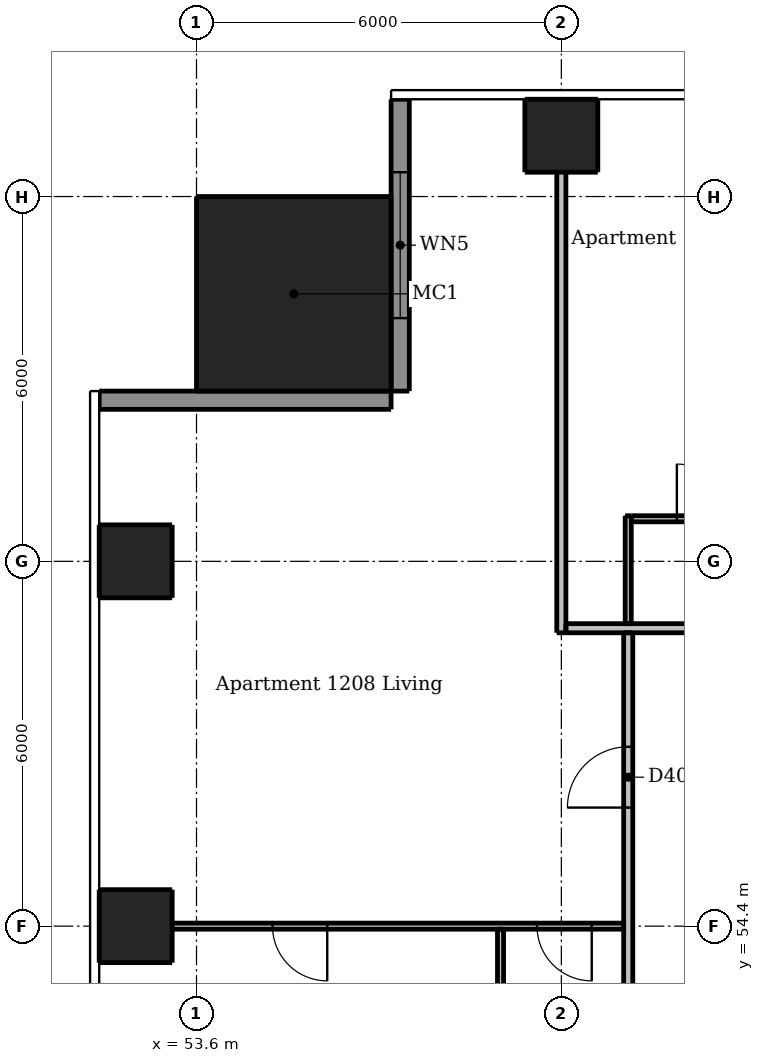
"""IFC4 building model, lengths in metres.
Left out: names, types, materials, properties, quantities, classifications, styles, units other than length and angle.
Written with IfcOpenShell. Run it as: python <this file> out.ifc"""

import sys

from ifc_helpers import new_model, si_unit, direction, frame, frame_2d, origin, origin_2d, place, context, subcontext, project, spatial, rectangle, extrude, element, fill, save


model = new_model("IFC4")
c1 = context("Model", 3, precision=1e-05, world=origin(), true_north=direction((0.0, 1.0)))
c2 = subcontext(c1, "Body", "Model", "MODEL_VIEW")
j1 = project(units=[si_unit("LENGTHUNIT", "METRE"), si_unit("PLANEANGLEUNIT", "RADIAN")], contexts=[c1])
p1 = place(None, origin())
s1 = spatial("IfcSite", under=j1, at=p1, CompositionType="ELEMENT")
p2 = place(p1, origin())
s2 = spatial("IfcBuilding", under=s1, at=p2, CompositionType="ELEMENT")
p3 = place(p2, frame((0.0, 0.0, 46.6)))
s3 = spatial("IfcBuildingStorey", under=s2, at=p3, CompositionType="ELEMENT", Elevation=46.6)
for number, where, z_axis, x_axis in (
    (1, (59.6, 67.4, 0.0), (0.0, 0.0, 1.0), (1.0, 0.0, 0.0)),
    (2, (52.6, 54.4, 0.0), (0.0, 0.0, 1.0), (1.0, 0.0, 0.0)),
    (3, (52.6, 60.4, 0.0), (0.0, 0.0, 1.0), (1.0, 0.0, 0.0)),
):
    element("IfcColumn", number, at=place(p3, frame(where, z_axis=z_axis, x_axis=x_axis)), inside=s3, PredefinedType="COLUMN", context=c2, shape_type="SweptSolid", body=[
        extrude(rectangle(XDim=1.2, YDim=1.2, at=origin_2d()), origin(), (0.0, 0.0, 1.0), 3.05),
    ])
p4 = place(p3, frame((55.2, 64.8, 0.0), z_axis=(0.0, 0.0, 1.0), x_axis=(1.0, 0.0, 0.0)))
e4 = element("IfcColumn", 4, at=p4, inside=s3, PredefinedType="COLUMN", context=c2, shape_type="SweptSolid", body=[
    extrude(rectangle(XDim=3.2, YDim=3.2, at=origin_2d()), origin(), (0.0, 0.0, 1.0), 3.3),
])
p5 = place(p3, frame((56.95, 68.0, 0.0), z_axis=(0.0, 0.0, 1.0), x_axis=(0.0, -1.0, 0.0)))
e5 = element("IfcWall", 5, at=p5, inside=s3, PredefinedType="SOLIDWALL", context=c2, shape_type="SweptSolid", body=[
    extrude(rectangle(XDim=4.8, YDim=0.3, at=frame_2d((2.4, 0.0))), origin(), (0.0, 0.0, 1.0), 3.05),
])
p6 = place(p5, frame((1.2, 0.0, 0.15)))
e6 = element("IfcOpeningElement", 6, at=p6, cuts=e5, PredefinedType="OPENING", context=c2, shape_type="SweptSolid", body=[
    extrude(rectangle(XDim=2.4, YDim=2.1, at=frame_2d((1.2, 1.05))), frame((0.0, 0.16, 0.0), z_axis=(0.0, -1.0, 0.0), x_axis=(1.0, 0.0, 0.0)), (0.0, 0.0, 1.0), 0.32),
])
p7 = place(p3, frame((56.8, 63.05, 0.0), z_axis=(0.0, 0.0, 1.0), x_axis=(-1.0, 0.0, 0.0)))
e7 = element("IfcWall", 7, at=p7, inside=s3, PredefinedType="SOLIDWALL", context=c2, shape_type="SweptSolid", body=[
    extrude(rectangle(XDim=4.8, YDim=0.3, at=frame_2d((2.4, 0.0))), origin(), (0.0, 0.0, 1.0), 3.05),
])
p8 = place(p3, frame((58.6, 54.35, 0.0), z_axis=(0.0, 0.0, 1.0), x_axis=(0.0, -1.0, 0.0)))
e8 = element("IfcWall", 8, at=p8, inside=s3, PredefinedType="PARTITIONING", context=c2, shape_type="SweptSolid", body=[
    extrude(rectangle(XDim=9.6, YDim=0.1, at=frame_2d((4.8, 0.0))), origin(), (0.0, 0.0, 1.0), 3.05),
])
p9 = place(p8, frame((7.35, 0.0, 0.0)))
e9 = element("IfcOpeningElement", 9, at=p9, cuts=e8, PredefinedType="OPENING", context=c2, shape_type="SweptSolid", body=[
    extrude(rectangle(XDim=0.8, YDim=2.1, at=frame_2d((0.4, 1.05))), frame((0.0, 0.06, 0.0), z_axis=(0.0, -1.0, 0.0), x_axis=(1.0, 0.0, 0.0)), (0.0, 0.0, 1.0), 0.12),
])
p10 = place(p8, frame((3.75, 0.0, 0.0)))
e10 = element("IfcOpeningElement", 10, at=p10, cuts=e8, PredefinedType="OPENING", context=c2, shape_type="SweptSolid", body=[
    extrude(rectangle(XDim=0.8, YDim=2.1, at=frame_2d((0.4, 1.05))), frame((0.0, 0.06, 0.0), z_axis=(0.0, -1.0, 0.0), x_axis=(1.0, 0.0, 0.0)), (0.0, 0.0, 1.0), 0.12),
])
p11 = place(p3, frame((60.7, 59.375, 0.0), z_axis=(0.0, 0.0, 1.0), x_axis=(0.0, 1.0, 0.0)))
e11 = element("IfcWall", 11, at=p11, inside=s3, PredefinedType="PARTITIONING", context=c2, shape_type="SweptSolid", body=[
    extrude(rectangle(XDim=1.775, YDim=0.1, at=frame_2d((0.887, 0.0))), origin(), (0.0, 0.0, 1.0), 3.05),
])
p12 = place(p3, frame((60.75, 61.1, 0.0), z_axis=(0.0, 0.0, 1.0), x_axis=(1.0, 0.0, 0.0)))
e12 = element("IfcWall", 12, at=p12, inside=s3, PredefinedType="PARTITIONING", context=c2, shape_type="SweptSolid", body=[
    extrude(rectangle(XDim=16.775, YDim=0.1, at=frame_2d((8.387, 0.0))), origin(), (0.0, 0.0, 1.0), 3.05),
])
p13 = place(p12, frame((11.3, 0.0, 0.0)))
e13 = element("IfcOpeningElement", 13, at=p13, cuts=e12, PredefinedType="OPENING", context=c2, shape_type="SweptSolid", body=[
    extrude(rectangle(XDim=0.9, YDim=2.1, at=frame_2d((0.45, 1.05))), frame((0.0, 0.06, 0.0), z_axis=(0.0, -1.0, 0.0), x_axis=(1.0, 0.0, 0.0)), (0.0, 0.0, 1.0), 0.12),
])
p14 = place(p12, frame((15.2, 0.0, 0.0)))
e14 = element("IfcOpeningElement", 14, at=p14, cuts=e12, PredefinedType="OPENING", context=c2, shape_type="SweptSolid", body=[
    extrude(rectangle(XDim=0.9, YDim=2.1, at=frame_2d((0.45, 1.05))), frame((0.0, 0.06, 0.0), z_axis=(0.0, -1.0, 0.0), x_axis=(1.0, 0.0, 0.0)), (0.0, 0.0, 1.0), 0.12),
])
p15 = place(p12, frame((13.1, 0.0, 0.0)))
e15 = element("IfcOpeningElement", 15, at=p15, cuts=e12, PredefinedType="OPENING", context=c2, shape_type="SweptSolid", body=[
    extrude(rectangle(XDim=0.9, YDim=2.1, at=frame_2d((0.45, 1.05))), frame((0.0, 0.06, 0.0), z_axis=(0.0, -1.0, 0.0), x_axis=(1.0, 0.0, 0.0)), (0.0, 0.0, 1.0), 0.12),
])
p16 = place(p12, frame((0.75, 0.0, 0.0)))
e16 = element("IfcOpeningElement", 16, at=p16, cuts=e12, PredefinedType="OPENING", context=c2, shape_type="SweptSolid", body=[
    extrude(rectangle(XDim=0.9, YDim=2.1, at=frame_2d((0.45, 1.05))), frame((0.0, 0.06, 0.0), z_axis=(0.0, -1.0, 0.0), x_axis=(1.0, 0.0, 0.0)), (0.0, 0.0, 1.0), 0.12),
])
p17 = place(p12, frame((6.2, 0.0, 0.0)))
e17 = element("IfcOpeningElement", 17, at=p17, cuts=e12, PredefinedType="OPENING", context=c2, shape_type="SweptSolid", body=[
    extrude(rectangle(XDim=0.9, YDim=2.1, at=frame_2d((0.45, 1.05))), frame((0.0, 0.06, 0.0), z_axis=(0.0, -1.0, 0.0), x_axis=(1.0, 0.0, 0.0)), (0.0, 0.0, 1.0), 0.12),
])
p18 = place(p12, frame((3.25, 0.0, 0.0)))
e18 = element("IfcOpeningElement", 18, at=p18, cuts=e12, PredefinedType="OPENING", context=c2, shape_type="SweptSolid", body=[
    extrude(rectangle(XDim=0.8, YDim=2.1, at=frame_2d((0.4, 1.05))), frame((0.0, 0.06, 0.0), z_axis=(0.0, -1.0, 0.0), x_axis=(1.0, 0.0, 0.0)), (0.0, 0.0, 1.0), 0.12),
])
p19 = place(p12, frame((9.25, 0.0, 0.0)))
e19 = element("IfcOpeningElement", 19, at=p19, cuts=e12, PredefinedType="OPENING", context=c2, shape_type="SweptSolid", body=[
    extrude(rectangle(XDim=0.8, YDim=2.1, at=frame_2d((0.4, 1.05))), frame((0.0, 0.06, 0.0), z_axis=(0.0, -1.0, 0.0), x_axis=(1.0, 0.0, 0.0)), (0.0, 0.0, 1.0), 0.12),
])
p20 = place(p3, frame((60.625, 54.4, 0.0), z_axis=(0.0, 0.0, 1.0), x_axis=(-1.0, 0.0, 0.0)))
e20 = element("IfcWall", 20, at=p20, inside=s3, PredefinedType="PARTITIONING", context=c2, shape_type="SweptSolid", body=[
    extrude(rectangle(XDim=8.625, YDim=0.1, at=frame_2d((4.312, 0.0))), origin(), (0.0, 0.0, 1.0), 2.516),
])
p21 = place(p20, frame((0.525, 0.0, 0.0)))
e21 = element("IfcOpeningElement", 21, at=p21, cuts=e20, PredefinedType="OPENING", context=c2, shape_type="SweptSolid", body=[
    extrude(rectangle(XDim=0.9, YDim=2.1, at=frame_2d((0.45, 1.05))), frame((0.0, 0.06, 0.0), z_axis=(0.0, -1.0, 0.0), x_axis=(1.0, 0.0, 0.0)), (0.0, 0.0, 1.0), 0.12),
])
p22 = place(p20, frame((4.875, 0.0, 0.0)))
e22 = element("IfcOpeningElement", 22, at=p22, cuts=e20, PredefinedType="OPENING", context=c2, shape_type="SweptSolid", body=[
    extrude(rectangle(XDim=0.9, YDim=2.1, at=frame_2d((0.45, 1.05))), frame((0.0, 0.06, 0.0), z_axis=(0.0, -1.0, 0.0), x_axis=(1.0, 0.0, 0.0)), (0.0, 0.0, 1.0), 0.12),
])
p23 = place(p3, frame((59.6, 59.225, 0.0), z_axis=(0.0, 0.0, 1.0), x_axis=(0.0, 1.0, 0.0)))
e23 = element("IfcWall", 23, at=p23, inside=s3, PredefinedType="PARTITIONING", context=c2, shape_type="SweptSolid", body=[
    extrude(rectangle(XDim=8.775, YDim=0.15, at=frame_2d((4.387, 0.0))), origin(), (0.0, 0.0, 1.0), 2.51),
])
p24 = place(p3, frame((60.7, 30.325, 0.0), z_axis=(0.0, 0.0, 1.0), x_axis=(0.0, 1.0, 0.0)))
e24 = element("IfcWall", 24, at=p24, inside=s3, PredefinedType="PARTITIONING", context=c2, shape_type="SweptSolid", body=[
    extrude(rectangle(XDim=28.9, YDim=0.15, at=frame_2d((14.45, 0.0))), origin(), (0.0, 0.0, 1.0), 3.05),
])
p25 = place(p24, frame((7.375, 0.0, 0.0)))
e25 = element("IfcOpeningElement", 25, at=p25, cuts=e24, PredefinedType="OPENING", context=c2, shape_type="SweptSolid", body=[
    extrude(rectangle(XDim=1.0, YDim=2.1, at=frame_2d((0.5, 1.05))), frame((0.0, 0.085, 0.0), z_axis=(0.0, -1.0, 0.0), x_axis=(1.0, 0.0, 0.0)), (0.0, 0.0, 1.0), 0.17),
])
p26 = place(p24, frame((26.025, 0.0, 0.0)))
e26 = element("IfcOpeningElement", 26, at=p26, cuts=e24, PredefinedType="OPENING", context=c2, shape_type="SweptSolid", body=[
    extrude(rectangle(XDim=1.0, YDim=2.1, at=frame_2d((0.5, 1.05))), frame((0.0, 0.085, 0.0), z_axis=(0.0, -1.0, 0.0), x_axis=(1.0, 0.0, 0.0)), (0.0, 0.0, 1.0), 0.17),
])
p27 = place(p3, frame((59.675, 59.3, 0.0), z_axis=(0.0, 0.0, 1.0), x_axis=(1.0, 0.0, 0.0)))
e27 = element("IfcWall", 27, at=p27, inside=s3, PredefinedType="PARTITIONING", context=c2, shape_type="SweptSolid", body=[
    extrude(rectangle(XDim=28.55, YDim=0.15, at=frame_2d((14.275, 0.0))), origin(), (0.0, 0.0, 1.0), 3.05),
])
p28 = place(p27, frame((8.975, 0.0, 0.0)))
e28 = element("IfcOpeningElement", 28, at=p28, cuts=e27, PredefinedType="OPENING", context=c2, shape_type="SweptSolid", body=[
    extrude(rectangle(XDim=1.0, YDim=2.1, at=frame_2d((0.5, 1.05))), frame((0.0, 0.085, 0.0), z_axis=(0.0, -1.0, 0.0), x_axis=(1.0, 0.0, 0.0)), (0.0, 0.0, 1.0), 0.17),
])
p29 = place(p27, frame((25.775, 0.0, 0.0)))
e29 = element("IfcOpeningElement", 29, at=p29, cuts=e27, PredefinedType="OPENING", context=c2, shape_type="SweptSolid", body=[
    extrude(rectangle(XDim=1.0, YDim=2.1, at=frame_2d((0.5, 1.05))), frame((0.0, 0.085, 0.0), z_axis=(0.0, -1.0, 0.0), x_axis=(1.0, 0.0, 0.0)), (0.0, 0.0, 1.0), 0.17),
])
p30 = place(p6, origin())
e30 = element("IfcWindow", 30, at=p30, inside=s3, PartitioningType="DOUBLE_PANEL_VERTICAL", PredefinedType="WINDOW", context=c2, shape_type="SweptSolid", body=[
    extrude(rectangle(XDim=2.4, YDim=2.1, at=frame_2d((1.2, 1.05))), frame((0.0, 0.03, 0.0), z_axis=(0.0, -1.0, 0.0), x_axis=(1.0, 0.0, 0.0)), (0.0, 0.0, 1.0), 0.06),
])
fill(e6, e30)
p31 = place(p16, origin())
e31 = element("IfcDoor", 31, at=p31, inside=s3, OperationType="SINGLE_SWING_LEFT", PredefinedType="DOOR", context=c2, shape_type="SweptSolid", body=[
    extrude(rectangle(XDim=0.9, YDim=2.1, at=frame_2d((0.45, 1.05))), frame((0.0, 0.025, 0.0), z_axis=(0.0, -1.0, 0.0), x_axis=(1.0, 0.0, 0.0)), (0.0, 0.0, 1.0), 0.05),
])
fill(e16, e31)
p32 = place(p26, origin())
e32 = element("IfcDoor", 32, at=p32, inside=s3, OperationType="SINGLE_SWING_LEFT", PredefinedType="DOOR", context=c2, shape_type="SweptSolid", body=[
    extrude(rectangle(XDim=1.0, YDim=2.1, at=frame_2d((0.5, 1.05))), frame((0.0, 0.025, 0.0), z_axis=(0.0, -1.0, 0.0), x_axis=(1.0, 0.0, 0.0)), (0.0, 0.0, 1.0), 0.05),
])
fill(e26, e32)
p33 = place(p21, origin())
e33 = element("IfcDoor", 33, at=p33, inside=s3, OperationType="SINGLE_SWING_LEFT", PredefinedType="DOOR", context=c2, shape_type="SweptSolid", body=[
    extrude(rectangle(XDim=0.9, YDim=2.1, at=frame_2d((0.45, 1.05))), frame((0.0, 0.025, 0.0), z_axis=(0.0, -1.0, 0.0), x_axis=(1.0, 0.0, 0.0)), (0.0, 0.0, 1.0), 0.05),
])
fill(e21, e33)
p34 = place(p22, origin())
e34 = element("IfcDoor", 34, at=p34, inside=s3, OperationType="SINGLE_SWING_LEFT", PredefinedType="DOOR", context=c2, shape_type="SweptSolid", body=[
    extrude(rectangle(XDim=0.9, YDim=2.1, at=frame_2d((0.45, 1.05))), frame((0.0, 0.025, 0.0), z_axis=(0.0, -1.0, 0.0), x_axis=(1.0, 0.0, 0.0)), (0.0, 0.0, 1.0), 0.05),
])
fill(e22, e34)
save(model, sys.argv[1])
